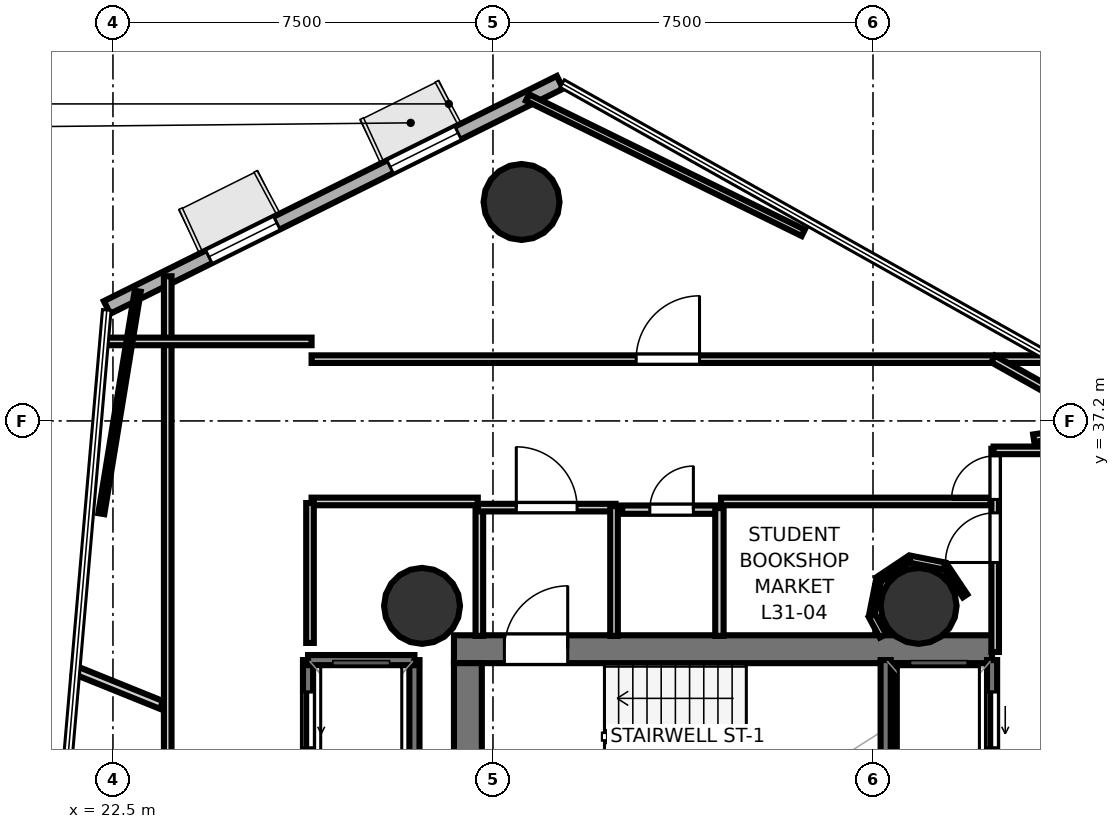
"""IFC4 building model, lengths in metres.
Left out: names, types, materials, properties, quantities, classifications, styles, units other than length and angle.
Written with IfcOpenShell. Run it as: python <this file> out.ifc"""

import sys

from ifc_helpers import new_model, si_unit, direction, frame, frame_2d, origin, origin_2d, place, context, subcontext, project, spatial, rectangle, hollow_circle, extrude, element, fill, save


model = new_model("IFC4")
c1 = context("Model", 3, precision=1e-05, world=origin(), true_north=direction((0.0, 1.0)))
c2 = subcontext(c1, "Body", "Model", "MODEL_VIEW")
j1 = project(units=[si_unit("LENGTHUNIT", "METRE"), si_unit("PLANEANGLEUNIT", "RADIAN")], contexts=[c1])
p1 = place(None, origin())
s1 = spatial("IfcSite", under=j1, at=p1, CompositionType="ELEMENT")
p2 = place(p1, origin())
s2 = spatial("IfcBuilding", under=s1, at=p2, CompositionType="ELEMENT")
p3 = place(p2, frame((0.0, 0.0, 123.7)))
s3 = spatial("IfcBuildingStorey", under=s2, at=p3, CompositionType="ELEMENT", Elevation=123.7)
p4 = place(p3, frame((29.23, 32.695, 0.0), z_axis=(0.0, 0.0, 1.0), x_axis=(1.0, 0.0, 0.0)))
e1 = element("IfcWall", 1, at=p4, inside=s3, PredefinedType="SHEAR", context=c2, shape_type="SweptSolid", body=[
    extrude(rectangle(XDim=10.62, YDim=0.55, at=frame_2d((5.31, 0.0))), origin(), (0.0, 0.0, 1.0), 3.52),
])
p5 = place(p4, frame((0.995, 0.0, 0.0)))
e2 = element("IfcOpeningElement", 2, at=p5, cuts=e1, PredefinedType="OPENING", context=c2, shape_type="SweptSolid", body=[
    extrude(rectangle(XDim=1.25, YDim=2.15, at=frame_2d((0.625, 1.075))), frame((0.0, 0.285, 0.0), z_axis=(0.0, -1.0, 0.0), x_axis=(1.0, 0.0, 0.0)), (0.0, 0.0, 1.0), 0.57),
])
p6 = place(p3, frame((29.505, 24.98, 0.0), z_axis=(0.0, 0.0, 1.0), x_axis=(0.0, 1.0, 0.0)))
e3 = element("IfcWall", 3, at=p6, inside=s3, PredefinedType="SHEAR", context=c2, shape_type="SweptSolid", body=[
    extrude(rectangle(XDim=7.44, YDim=0.55, at=frame_2d((3.72, 0.0))), origin(), (0.0, 0.0, 1.0), 3.52),
])
p7 = place(p3, frame((38.18, 24.98, 0.0), z_axis=(0.0, 0.0, 1.0), x_axis=(0.0, 1.0, 0.0)))
e4 = element("IfcWall", 4, at=p7, inside=s3, PredefinedType="SHEAR", context=c2, shape_type="SweptSolid", body=[
    extrude(rectangle(XDim=7.44, YDim=0.5, at=frame_2d((3.72, 0.0))), origin(), (0.0, 0.0, 1.0), 3.52),
])
for number, where, z_axis, x_axis in (
    (5, (28.6, 33.55, 0.0), (0.0, 0.0, 1.0), (1.0, 0.0, 0.0)),
    (6, (38.4, 33.55, 0.0), (0.0, 0.0, 1.0), (1.0, 0.0, 0.0)),
    (7, (30.564, 41.521, 0.0), (0.0, 0.0, 1.0), (1.0, 0.0, 0.0)),
):
    element("IfcColumn", number, at=place(p3, frame(where, z_axis=z_axis, x_axis=x_axis)), inside=s3, PredefinedType="COLUMN", context=c2, shape_type="SweptSolid", body=[
        extrude(hollow_circle(Radius=0.75, WallThickness=0.036, at=origin_2d()), origin(), (0.0, 0.0, 1.0), 3.7),
    ])
p8 = place(p3, frame((31.323, 43.882, 0.0), z_axis=(0.0, 0.0, 1.0), x_axis=(-0.895510377487, -0.445040631643, 0.0)))
e8 = element("IfcWall", 8, at=p8, inside=s3, PredefinedType="SOLIDWALL", context=c2, shape_type="SweptSolid", body=[
    extrude(rectangle(XDim=9.983, YDim=0.28, at=frame_2d((4.992, 0.0))), origin(), (0.0, 0.0, 1.0), 3.52),
])
p9 = place(p8, frame((2.245, 0.0, 0.85)))
e9 = element("IfcOpeningElement", 9, at=p9, cuts=e8, PredefinedType="OPENING", context=c2, shape_type="SweptSolid", body=[
    extrude(rectangle(XDim=1.5, YDim=2.1, at=frame_2d((0.75, 1.05))), frame((0.0, 0.15, 0.0), z_axis=(0.0, -1.0, 0.0), x_axis=(1.0, 0.0, 0.0)), (0.0, 0.0, 1.0), 0.3),
])
p10 = place(p8, frame((6.238, 0.0, 0.85)))
e10 = element("IfcOpeningElement", 10, at=p10, cuts=e8, PredefinedType="OPENING", context=c2, shape_type="SweptSolid", body=[
    extrude(rectangle(XDim=1.5, YDim=2.1, at=frame_2d((0.75, 1.05))), frame((0.0, 0.15, 0.0), z_axis=(0.0, -1.0, 0.0), x_axis=(1.0, 0.0, 0.0)), (0.0, 0.0, 1.0), 0.3),
])
p11 = place(p3, frame((39.85, 30.12, 0.0), z_axis=(0.0, 0.0, 1.0), x_axis=(0.0, 1.0, 0.0)))
e11 = element("IfcWall", 11, at=p11, inside=s3, PredefinedType="SOLIDWALL", context=c2, shape_type="SweptSolid", body=[
    extrude(rectangle(XDim=2.36, YDim=0.2, at=frame_2d((1.18, 0.0))), origin(), (0.0, 0.0, 1.0), 3.52),
])
p12 = place(p11, frame((0.63, 0.0, 0.0)))
e12 = element("IfcOpeningElement", 12, at=p12, cuts=e11, PredefinedType="OPENING", context=c2, shape_type="SweptSolid", body=[
    extrude(rectangle(XDim=1.1, YDim=2.15, at=frame_2d((0.55, 1.075))), frame((0.0, 0.11, 0.0), z_axis=(0.0, -1.0, 0.0), x_axis=(1.0, 0.0, 0.0)), (0.0, 0.0, 1.0), 0.22),
])
for number, where, z_axis, x_axis in (
    (13, (37.75, 30.12, 0.0), (0.0, 0.0, 1.0), (0.0, 1.0, 0.0)),
    (14, (28.45, 30.12, 0.0), (0.0, 0.0, 1.0), (0.0, 1.0, 0.0)),
):
    element("IfcWall", number, at=place(p3, frame(where, z_axis=z_axis, x_axis=x_axis)), inside=s3, PredefinedType="SOLIDWALL", context=c2, shape_type="SweptSolid", body=[
        extrude(rectangle(XDim=2.36, YDim=0.2, at=frame_2d((1.18, 0.0))), origin(), (0.0, 0.0, 1.0), 3.52),
    ])
p13 = place(p3, frame((26.35, 30.12, 0.0), z_axis=(0.0, 0.0, 1.0), x_axis=(0.0, 1.0, 0.0)))
e15 = element("IfcWall", 15, at=p13, inside=s3, PredefinedType="SOLIDWALL", context=c2, shape_type="SweptSolid", body=[
    extrude(rectangle(XDim=2.36, YDim=0.2, at=frame_2d((1.18, 0.0))), origin(), (0.0, 0.0, 1.0), 3.52),
])
p14 = place(p13, frame((0.63, 0.0, 0.0)))
e16 = element("IfcOpeningElement", 16, at=p14, cuts=e15, PredefinedType="OPENING", context=c2, shape_type="SweptSolid", body=[
    extrude(rectangle(XDim=1.1, YDim=2.15, at=frame_2d((0.55, 1.075))), frame((0.0, 0.11, 0.0), z_axis=(0.0, -1.0, 0.0), x_axis=(1.0, 0.0, 0.0)), (0.0, 0.0, 1.0), 0.22),
])
p15 = place(p3, frame((26.35, 32.48, 0.0), z_axis=(0.0, 0.0, 1.0), x_axis=(1.0, 0.0, 0.0)))
e17 = element("IfcWall", 17, at=p15, inside=s3, PredefinedType="SOLIDWALL", context=c2, shape_type="SweptSolid", body=[
    extrude(rectangle(XDim=2.1, YDim=0.2, at=frame_2d((1.05, 0.0))), origin(), (0.0, 0.0, 1.0), 3.52),
])
p16 = place(p3, frame((29.731, 32.958, 0.0), z_axis=(0.0, 0.0, 1.0), x_axis=(0.0, 1.0, 0.0)))
e18 = element("IfcWall", 18, at=p16, inside=s3, PredefinedType="PARTITIONING", context=c2, shape_type="SweptSolid", body=[
    extrude(rectangle(XDim=2.562, YDim=0.15, at=frame_2d((1.281, 0.0))), origin(), (0.0, 0.0, 1.0), 2.84),
])
p17 = place(p3, frame((29.7, 35.489, 0.0), z_axis=(0.0, 0.0, 1.0), x_axis=(1.0, 0.0, 0.0)))
e19 = element("IfcWall", 19, at=p17, inside=s3, PredefinedType="PARTITIONING", context=c2, shape_type="SweptSolid", body=[
    extrude(rectangle(XDim=2.72, YDim=0.15, at=frame_2d((1.36, 0.0))), origin(), (0.0, 0.0, 1.0), 2.84),
])
p18 = place(p17, frame((0.76, 0.0, 0.0)))
e20 = element("IfcOpeningElement", 20, at=p18, cuts=e19, PredefinedType="OPENING", context=c2, shape_type="SweptSolid", body=[
    extrude(rectangle(XDim=1.2, YDim=2.15, at=frame_2d((0.6, 1.075))), frame((0.0, 0.085, 0.0), z_axis=(0.0, -1.0, 0.0), x_axis=(1.0, 0.0, 0.0)), (0.0, 0.0, 1.0), 0.17),
])
p19 = place(p3, frame((32.389, 35.52, 0.0), z_axis=(0.0, 0.0, 1.0), x_axis=(0.0, -1.0, 0.0)))
e21 = element("IfcWall", 21, at=p19, inside=s3, PredefinedType="PARTITIONING", context=c2, shape_type="SweptSolid", body=[
    extrude(rectangle(XDim=2.562, YDim=0.15, at=frame_2d((1.281, 0.0))), origin(), (0.0, 0.0, 1.0), 2.84),
])
p20 = place(p3, frame((39.911, 32.64, 0.0), z_axis=(0.0, 0.0, 1.0), x_axis=(0.0, 1.0, 0.0)))
e22 = element("IfcWall", 22, at=p20, inside=s3, PredefinedType="PARTITIONING", context=c2, shape_type="SweptSolid", body=[
    extrude(rectangle(XDim=4.01, YDim=0.15, at=frame_2d((2.005, 0.0))), origin(), (0.0, 0.0, 1.0), 2.84),
])
p21 = place(p20, frame((3.01, 0.0, 0.0)))
e23 = element("IfcOpeningElement", 23, at=p21, cuts=e22, PredefinedType="OPENING", context=c2, shape_type="SweptSolid", body=[
    extrude(rectangle(XDim=0.86, YDim=2.05, at=frame_2d((0.43, 1.025))), frame((0.0, 0.085, 0.0), z_axis=(0.0, -1.0, 0.0), x_axis=(1.0, 0.0, 0.0)), (0.0, 0.0, 1.0), 0.17),
])
p22 = place(p20, frame((1.766, 0.0, 0.0)))
e24 = element("IfcOpeningElement", 24, at=p22, cuts=e22, PredefinedType="OPENING", context=c2, shape_type="SweptSolid", body=[
    extrude(rectangle(XDim=0.98, YDim=2.1, at=frame_2d((0.49, 1.05))), frame((0.0, 0.085, 0.0), z_axis=(0.0, -1.0, 0.0), x_axis=(1.0, 0.0, 0.0)), (0.0, 0.0, 1.0), 0.17),
])
p23 = place(p3, frame((39.88, 36.619, 0.0), z_axis=(0.0, 0.0, 1.0), x_axis=(1.0, 0.0, 0.0)))
e25 = element("IfcWall", 25, at=p23, inside=s3, PredefinedType="PARTITIONING", context=c2, shape_type="SweptSolid", body=[
    extrude(rectangle(XDim=4.399, YDim=0.15, at=frame_2d((2.199, 0.0))), origin(), (0.0, 0.0, 1.0), 2.84),
])
p24 = place(p3, frame((32.55, 35.449, 0.0), z_axis=(0.0, 0.0, 1.0), x_axis=(1.0, 0.0, 0.0)))
e26 = element("IfcWall", 26, at=p24, inside=s3, PredefinedType="PLUMBINGWALL", context=c2, shape_type="SweptSolid", body=[
    extrude(rectangle(XDim=1.95, YDim=0.165, at=frame_2d((0.975, 0.0))), origin(), (0.0, 0.0, 1.0), 2.84),
])
p25 = place(p24, frame((0.545, 0.0, 0.0)))
e27 = element("IfcOpeningElement", 27, at=p25, cuts=e26, PredefinedType="OPENING", context=c2, shape_type="SweptSolid", body=[
    extrude(rectangle(XDim=0.86, YDim=2.05, at=frame_2d((0.43, 1.025))), frame((0.0, 0.093, 0.0), z_axis=(0.0, -1.0, 0.0), x_axis=(1.0, 0.0, 0.0)), (0.0, 0.0, 1.0), 0.185),
])
p26 = place(p3, frame((34.469, 35.48, 0.0), z_axis=(0.0, 0.0, 1.0), x_axis=(0.0, -1.0, 0.0)))
e28 = element("IfcWall", 28, at=p26, inside=s3, PredefinedType="PLUMBINGWALL", context=c2, shape_type="SweptSolid", body=[
    extrude(rectangle(XDim=2.522, YDim=0.165, at=frame_2d((1.261, 0.0))), origin(), (0.0, 0.0, 1.0), 2.84),
])
p27 = place(p3, frame((23.581, 28.307, 0.0), z_axis=(0.0, 0.0, 1.0), x_axis=(0.0, 1.0, 0.0)))
e29 = element("IfcWall", 29, at=p27, inside=s3, PredefinedType="PARTITIONING", context=c2, shape_type="SweptSolid", body=[
    extrude(rectangle(XDim=11.748, YDim=0.15, at=frame_2d((5.874, 0.0))), origin(), (0.0, 0.0, 1.0), 2.84),
])
p28 = place(p3, frame((22.304, 38.769, 0.0), z_axis=(0.0, 0.0, 1.0), x_axis=(1.0, 0.0, 0.0)))
e30 = element("IfcWall", 30, at=p28, inside=s3, PredefinedType="PARTITIONING", context=c2, shape_type="SweptSolid", body=[
    extrude(rectangle(XDim=4.115, YDim=0.15, at=frame_2d((2.058, 0.0))), origin(), (0.0, 0.0, 1.0), 2.84),
])
p29 = place(p3, frame((26.42, 38.419, 0.0), z_axis=(0.0, 0.0, 1.0), x_axis=(1.0, 0.0, 0.0)))
e31 = element("IfcWall", 31, at=p29, inside=s3, PredefinedType="PARTITIONING", context=c2, shape_type="SweptSolid", body=[
    extrude(rectangle(XDim=14.653, YDim=0.15, at=frame_2d((7.326, 0.0))), origin(), (0.0, 0.0, 1.0), 2.84),
])
p30 = place(p29, frame((6.406, 0.0, 0.0)))
e32 = element("IfcOpeningElement", 32, at=p30, cuts=e31, PredefinedType="OPENING", context=c2, shape_type="SweptSolid", body=[
    extrude(rectangle(XDim=1.25, YDim=2.2, at=frame_2d((0.625, 1.1))), frame((0.0, 0.085, 0.0), z_axis=(0.0, -1.0, 0.0), x_axis=(1.0, 0.0, 0.0)), (0.0, 0.0, 1.0), 0.17),
])
p31 = place(p3, frame((39.869, 38.423, 0.0), z_axis=(0.0, 0.0, 1.0), x_axis=(0.87196097956, -0.489575377368, 0.0)))
e33 = element("IfcWall", 33, at=p31, inside=s3, PredefinedType="PARTITIONING", context=c2, shape_type="SweptSolid", body=[
    extrude(rectangle(XDim=2.806, YDim=0.15, at=frame_2d((1.403, 0.0))), origin(), (0.0, 0.0, 1.0), 2.84),
])
p32 = place(p3, frame((43.186, 37.236, 0.0), z_axis=(0.0, 0.0, 1.0), x_axis=(-0.9889539611, -0.148223017191, 0.0)))
e34 = element("IfcWall", 34, at=p32, inside=s3, PredefinedType="PARTITIONING", context=c2, shape_type="SweptSolid", body=[
    extrude(rectangle(XDim=2.542, YDim=0.15, at=frame_2d((1.271, 0.0))), origin(), (0.0, 0.0, 1.0), 2.84),
])
p33 = place(p3, frame((39.818, 35.611, 0.0), z_axis=(0.0, 0.0, 1.0), x_axis=(-1.0, 0.0, 0.0)))
e35 = element("IfcWall", 35, at=p33, inside=s3, PredefinedType="PARTITIONING", context=c2, shape_type="SweptSolid", body=[
    extrude(rectangle(XDim=5.318, YDim=0.15, at=frame_2d((2.659, 0.0))), origin(), (0.0, 0.0, 1.0), 2.84),
])
p34 = place(p3, frame((29.7, 35.611, 0.0), z_axis=(0.0, 0.0, 1.0), x_axis=(-1.0, 0.0, 0.0)))
e36 = element("IfcWall", 36, at=p34, inside=s3, PredefinedType="PARTITIONING", context=c2, shape_type="SweptSolid", body=[
    extrude(rectangle(XDim=3.28, YDim=0.15, at=frame_2d((1.64, 0.0))), origin(), (0.0, 0.0, 1.0), 2.84),
])
p35 = place(p3, frame((26.389, 35.58, 0.0), z_axis=(0.0, 0.0, 1.0), x_axis=(0.0, -1.0, 0.0)))
e37 = element("IfcWall", 37, at=p35, inside=s3, PredefinedType="PARTITIONING", context=c2, shape_type="SweptSolid", body=[
    extrude(rectangle(XDim=2.761, YDim=0.15, at=frame_2d((1.381, 0.0))), origin(), (0.0, 0.0, 1.0), 2.84),
])
p36 = place(p3, frame((21.743, 32.288, 0.0), z_axis=(0.0, 0.0, 1.0), x_axis=(0.927188084006, -0.374596125017, 0.0)))
e38 = element("IfcWall", 38, at=p36, inside=s3, PredefinedType="PLUMBINGWALL", context=c2, shape_type="SweptSolid", body=[
    extrude(rectangle(XDim=1.85, YDim=0.165, at=frame_2d((0.925, 0.0))), origin(), (0.0, 0.0, 1.0), 2.84),
])
p37 = place(p3, frame((39.317, 33.748, 0.0), z_axis=(0.0, 0.0, 1.0), x_axis=(-0.556649926744, 0.830747169153, 0.0)))
e39 = element("IfcWall", 39, at=p37, inside=s3, PredefinedType="PARTITIONING", context=c2, shape_type="SweptSolid", body=[
    extrude(rectangle(XDim=0.693, YDim=0.105, at=frame_2d((0.346, 0.0))), origin(), (0.0, 0.0, 1.0), 2.84),
])
p38 = place(p3, frame((38.912, 34.337, 0.0), z_axis=(0.0, 0.0, 1.0), x_axis=(-0.98075554424, 0.195239756305, 0.0)))
e40 = element("IfcWall", 40, at=p38, inside=s3, PredefinedType="PARTITIONING", context=c2, shape_type="SweptSolid", body=[
    extrude(rectangle(XDim=0.697, YDim=0.14, at=frame_2d((0.348, 0.0))), origin(), (0.0, 0.0, 1.0), 2.84),
])
p39 = place(p3, frame((38.205, 34.468, 0.0), z_axis=(0.0, 0.0, 1.0), x_axis=(-0.831348365513, -0.555751648814, 0.0)))
e41 = element("IfcWall", 41, at=p39, inside=s3, PredefinedType="PARTITIONING", context=c2, shape_type="SweptSolid", body=[
    extrude(rectangle(XDim=0.696, YDim=0.12, at=frame_2d((0.348, 0.0))), origin(), (0.0, 0.0, 1.0), 2.84),
])
p40 = place(p3, frame((37.613, 34.062, 0.0), z_axis=(0.0, 0.0, 1.0), x_axis=(-0.195239756305, -0.98075554424, 0.0)))
e42 = element("IfcWall", 42, at=p40, inside=s3, PredefinedType="PARTITIONING", context=c2, shape_type="SweptSolid", body=[
    extrude(rectangle(XDim=0.697, YDim=0.105, at=frame_2d((0.348, 0.0))), origin(), (0.0, 0.0, 1.0), 2.84),
])
p41 = place(p3, frame((37.48, 33.358, 0.0), z_axis=(0.0, 0.0, 1.0), x_axis=(0.471593841364, -0.881815881455, 0.0)))
e43 = element("IfcWall", 43, at=p41, inside=s3, PredefinedType="PARTITIONING", context=c2, shape_type="SweptSolid", body=[
    extrude(rectangle(XDim=0.454, YDim=0.14, at=frame_2d((0.227, 0.0))), origin(), (0.0, 0.0, 1.0), 2.84),
])
p42 = place(p3, frame((22.271, 35.37, 0.0), z_axis=(0.0, 0.0, 1.0), x_axis=(0.161416648248, 0.986886348912, 0.0)))
e44 = element("IfcWall", 44, at=p42, inside=s3, PredefinedType="PARTITIONING", context=c2, shape_type="SweptSolid", body=[
    extrude(rectangle(XDim=4.448, YDim=0.12, at=frame_2d((2.224, 0.0))), origin(), (0.0, 0.0, 1.0), 2.84),
])
p43 = place(p3, frame((30.681, 43.582, 0.0), z_axis=(0.0, 0.0, 1.0), x_axis=(0.897761161536, -0.440482572684, 0.0)))
e45 = element("IfcWall", 45, at=p43, inside=s3, PredefinedType="PARTITIONING", context=c2, shape_type="SweptSolid", body=[
    extrude(rectangle(XDim=6.061, YDim=0.14, at=frame_2d((3.031, 0.0))), origin(), (0.0, 0.0, 1.0), 2.84),
])
p44 = place(p5, origin())
e46 = element("IfcDoor", 46, at=p44, inside=s3, OperationType="SINGLE_SWING_RIGHT", PredefinedType="DOOR", context=c2, shape_type="SweptSolid", body=[
    extrude(rectangle(XDim=1.25, YDim=2.15, at=frame_2d((0.625, 1.075))), frame((0.0, 0.025, 0.0), z_axis=(0.0, -1.0, 0.0), x_axis=(1.0, 0.0, 0.0)), (0.0, 0.0, 1.0), 0.05),
])
fill(e2, e46)
p45 = place(p12, origin())
e47 = element("IfcDoor", 47, at=p45, inside=s3, OperationType="SLIDING_TO_LEFT", PredefinedType="DOOR", context=c2, shape_type="SweptSolid", body=[
    extrude(rectangle(XDim=1.1, YDim=2.15, at=frame_2d((0.55, 1.075))), frame((0.0, 0.025, 0.0), z_axis=(0.0, -1.0, 0.0), x_axis=(1.0, 0.0, 0.0)), (0.0, 0.0, 1.0), 0.05),
])
fill(e12, e47)
p46 = place(p14, origin())
e48 = element("IfcDoor", 48, at=p46, inside=s3, OperationType="SLIDING_TO_LEFT", PredefinedType="DOOR", context=c2, shape_type="SweptSolid", body=[
    extrude(rectangle(XDim=1.1, YDim=2.15, at=frame_2d((0.55, 1.075))), frame((0.0, 0.025, 0.0), z_axis=(0.0, -1.0, 0.0), x_axis=(1.0, 0.0, 0.0)), (0.0, 0.0, 1.0), 0.05),
])
fill(e16, e48)
p47 = place(p18, origin())
e49 = element("IfcDoor", 49, at=p47, inside=s3, OperationType="SINGLE_SWING_LEFT", PredefinedType="DOOR", context=c2, shape_type="SweptSolid", body=[
    extrude(rectangle(XDim=1.2, YDim=2.15, at=frame_2d((0.6, 1.075))), frame((0.0, 0.025, 0.0), z_axis=(0.0, -1.0, 0.0), x_axis=(1.0, 0.0, 0.0)), (0.0, 0.0, 1.0), 0.05),
])
fill(e20, e49)
p48 = place(p21, origin())
e50 = element("IfcDoor", 50, at=p48, inside=s3, OperationType="SINGLE_SWING_LEFT", PredefinedType="DOOR", context=c2, shape_type="SweptSolid", body=[
    extrude(rectangle(XDim=0.86, YDim=2.05, at=frame_2d((0.43, 1.025))), frame((0.0, 0.025, 0.0), z_axis=(0.0, -1.0, 0.0), x_axis=(1.0, 0.0, 0.0)), (0.0, 0.0, 1.0), 0.05),
])
fill(e23, e50)
p49 = place(p25, origin())
e51 = element("IfcDoor", 51, at=p49, inside=s3, OperationType="SINGLE_SWING_RIGHT", PredefinedType="DOOR", context=c2, shape_type="SweptSolid", body=[
    extrude(rectangle(XDim=0.86, YDim=2.05, at=frame_2d((0.43, 1.025))), frame((0.0, 0.025, 0.0), z_axis=(0.0, -1.0, 0.0), x_axis=(1.0, 0.0, 0.0)), (0.0, 0.0, 1.0), 0.05),
])
fill(e27, e51)
p50 = place(p22, origin())
e52 = element("IfcDoor", 52, at=p50, inside=s3, OperationType="SINGLE_SWING_LEFT", PredefinedType="DOOR", context=c2, shape_type="SweptSolid", body=[
    extrude(rectangle(XDim=0.98, YDim=2.1, at=frame_2d((0.49, 1.05))), frame((0.0, 0.025, 0.0), z_axis=(0.0, -1.0, 0.0), x_axis=(1.0, 0.0, 0.0)), (0.0, 0.0, 1.0), 0.05),
])
fill(e24, e52)
p51 = place(p30, origin())
e53 = element("IfcDoor", 53, at=p51, inside=s3, OperationType="SINGLE_SWING_RIGHT", PredefinedType="DOOR", context=c2, shape_type="SweptSolid", body=[
    extrude(rectangle(XDim=1.25, YDim=2.2, at=frame_2d((0.625, 1.1))), frame((0.0, 0.025, 0.0), z_axis=(0.0, -1.0, 0.0), x_axis=(1.0, 0.0, 0.0)), (0.0, 0.0, 1.0), 0.05),
])
fill(e32, e53)
p52 = place(p9, origin())
e54 = element("IfcWindow", 54, at=p52, inside=s3, PartitioningType="SINGLE_PANEL", PredefinedType="WINDOW", context=c2, shape_type="SweptSolid", body=[
    extrude(rectangle(XDim=1.5, YDim=2.1, at=frame_2d((0.75, 1.05))), frame((0.0, 0.03, 0.0), z_axis=(0.0, -1.0, 0.0), x_axis=(1.0, 0.0, 0.0)), (0.0, 0.0, 1.0), 0.06),
])
fill(e9, e54)
p53 = place(p10, origin())
e55 = element("IfcWindow", 55, at=p53, inside=s3, PartitioningType="SINGLE_PANEL", PredefinedType="WINDOW", context=c2, shape_type="SweptSolid", body=[
    extrude(rectangle(XDim=1.5, YDim=2.1, at=frame_2d((0.75, 1.05))), frame((0.0, 0.03, 0.0), z_axis=(0.0, -1.0, 0.0), x_axis=(1.0, 0.0, 0.0)), (0.0, 0.0, 1.0), 0.06),
])
fill(e10, e55)
save(model, sys.argv[1])
